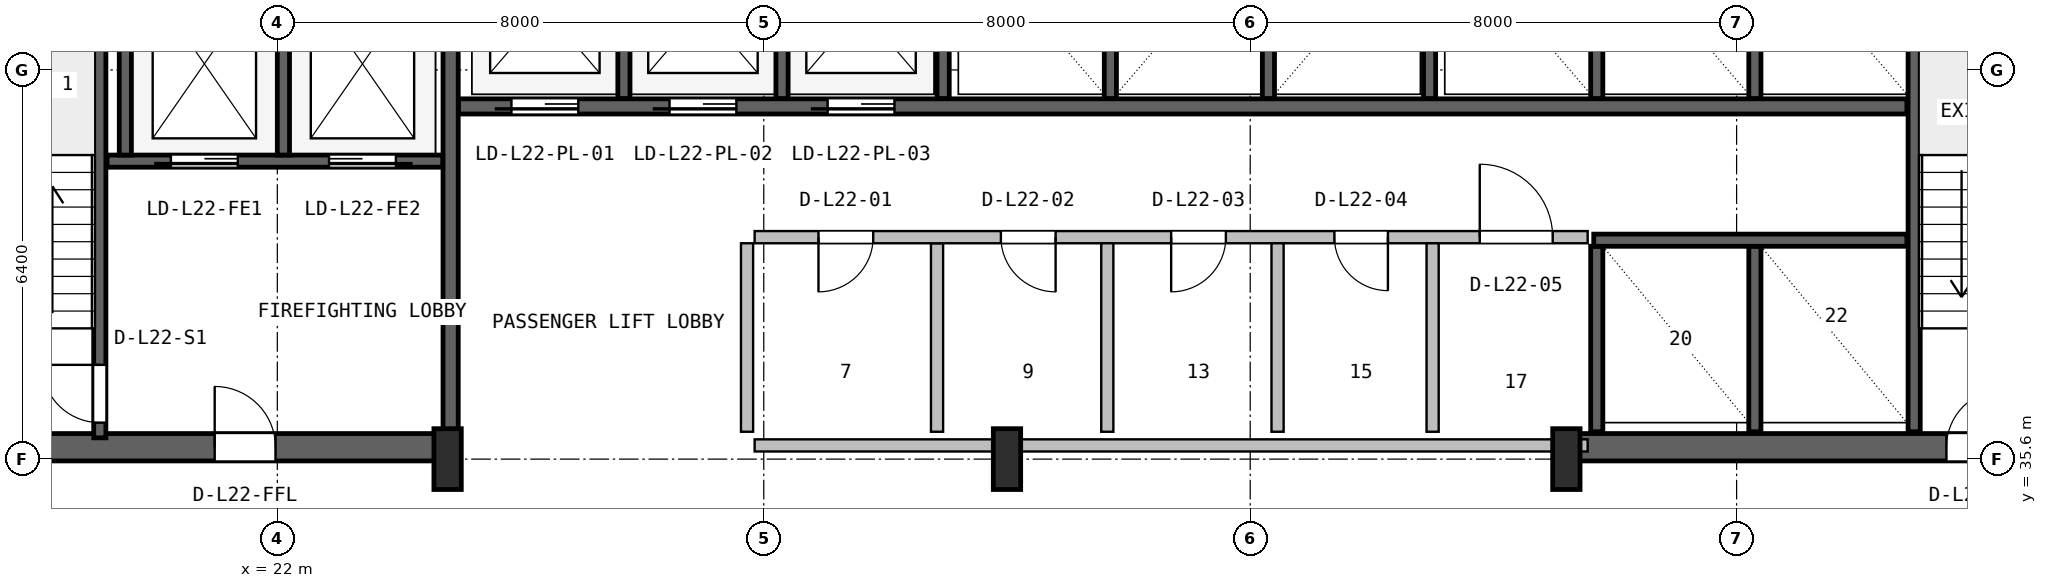
"""IFC4 building model, lengths in metres.
Left out: names, types, materials, properties, quantities, classifications, styles, units other than length and angle.
Written with IfcOpenShell. Run it as: python <this file> out.ifc"""

import sys

from ifc_helpers import new_model, si_unit, direction, frame, frame_2d, origin, origin_2d, place, context, subcontext, project, spatial, rectangle, i_section, extrude, source, transform, mapped, element, fill, save


model = new_model("IFC4")
c1 = context("Model", 3, precision=1e-05, world=origin(), true_north=direction((0.0, 1.0)))
c2 = subcontext(c1, "Body", "Model", "MODEL_VIEW")
j1 = project(units=[si_unit("LENGTHUNIT", "METRE"), si_unit("PLANEANGLEUNIT", "RADIAN")], contexts=[c1])
p1 = place(None, origin())
s1 = spatial("IfcSite", under=j1, at=p1, CompositionType="ELEMENT")
p2 = place(p1, origin())
s2 = spatial("IfcBuilding", under=s1, at=p2, CompositionType="ELEMENT")
p3 = place(p2, frame((0.0, 0.0, 94.6)))
s3 = spatial("IfcBuildingStorey", under=s2, at=p3, CompositionType="ELEMENT", Elevation=94.6)
p4 = place(p3, frame((15.57, 35.795, 0.0), z_axis=(0.0, 0.0, 1.0), x_axis=(1.0, 0.0, 0.0)))
e1 = element("IfcWall", 1, at=p4, inside=s3, PredefinedType="SHEAR", context=c2, shape_type="SweptSolid", body=[
    extrude(rectangle(XDim=9.23, YDim=0.45, at=frame_2d((4.615, 0.0))), origin(), (0.0, 0.0, 1.0), 3.52),
])
p5 = place(p4, frame((5.4, 0.0, 0.0)))
e2 = element("IfcOpeningElement", 2, at=p5, cuts=e1, PredefinedType="OPENING", context=c2, shape_type="SweptSolid", body=[
    extrude(rectangle(XDim=1.0, YDim=2.1, at=frame_2d((0.5, 1.05))), frame((0.0, 0.235, 0.0), z_axis=(0.0, -1.0, 0.0), x_axis=(1.0, 0.0, 0.0)), (0.0, 0.0, 1.0), 0.47),
])
p6 = place(p3, frame((43.2, 35.795, 0.0), z_axis=(0.0, 0.0, 1.0), x_axis=(1.0, 0.0, 0.0)))
e3 = element("IfcWall", 3, at=p6, inside=s3, PredefinedType="SHEAR", context=c2, shape_type="SweptSolid", body=[
    extrude(rectangle(XDim=9.23, YDim=0.45, at=frame_2d((4.615, 0.0))), origin(), (0.0, 0.0, 1.0), 3.52),
])
p7 = place(p6, frame((6.25, 0.0, 0.0)))
e4 = element("IfcOpeningElement", 4, at=p7, cuts=e3, PredefinedType="OPENING", context=c2, shape_type="SweptSolid", body=[
    extrude(rectangle(XDim=0.95, YDim=2.1, at=frame_2d((0.475, 1.05))), frame((0.0, 0.235, 0.0), z_axis=(0.0, -1.0, 0.0), x_axis=(1.0, 0.0, 0.0)), (0.0, 0.0, 1.0), 0.47),
])
m1 = source(origin(), c2, "Body", "SweptSolid", [
    extrude(i_section(OverallWidth=0.45, OverallDepth=1.0, WebThickness=0.016, FlangeThickness=0.03, FilletRadius=0.016, at=origin_2d()), origin(), (0.0, 0.0, 1.0), 3.8),
])
for number, where, z_axis, x_axis in (
    (5, (24.8, 35.6, 0.0), (0.0, 0.0, 1.0), (1.0, 0.0, 0.0)),
    (6, (34.0, 35.6, 0.0), (0.0, 0.0, 1.0), (1.0, 0.0, 0.0)),
    (7, (43.2, 35.6, 0.0), (0.0, 0.0, 1.0), (1.0, 0.0, 0.0)),
):
    element("IfcColumn", number, at=place(p3, frame(where, z_axis=z_axis, x_axis=x_axis)), inside=s3, PredefinedType="COLUMN", context=c2, shape_type="MappedRepresentation", body=[
        mapped(m1, transform((0.0, 0.0, 0.0), x_axis=(1.0, 0.0, 0.0), y_axis=(0.0, 1.0, 0.0), z_axis=(0.0, 0.0, 1.0), scale=1.0)),
    ])
p8 = place(p3, frame((19.08, 35.95, 0.0), z_axis=(0.0, 0.0, 1.0), x_axis=(0.0, 1.0, 0.0)))
e8 = element("IfcWall", 8, at=p8, inside=s3, PredefinedType="SHEAR", context=c2, shape_type="SweptSolid", body=[
    extrude(rectangle(XDim=9.65, YDim=0.2, at=frame_2d((4.825, 0.0))), origin(), (0.0, 0.0, 1.0), 3.52),
])
p9 = place(p8, frame((0.25, 0.0, 0.0)))
e9 = element("IfcOpeningElement", 9, at=p9, cuts=e8, PredefinedType="OPENING", context=c2, shape_type="SweptSolid", body=[
    extrude(rectangle(XDim=0.95, YDim=2.1, at=frame_2d((0.475, 1.05))), frame((0.0, 0.11, 0.0), z_axis=(0.0, -1.0, 0.0), x_axis=(1.0, 0.0, 0.0)), (0.0, 0.0, 1.0), 0.22),
])
p10 = place(p3, frame((24.85, 36.05, 0.0), z_axis=(0.0, 0.0, 1.0), x_axis=(0.0, 1.0, 0.0)))
e10 = element("IfcWall", 10, at=p10, inside=s3, PredefinedType="SHEAR", context=c2, shape_type="SweptSolid", body=[
    extrude(rectangle(XDim=10.45, YDim=0.25, at=frame_2d((5.225, 0.0))), origin(), (0.0, 0.0, 1.0), 3.52),
])
p11 = place(p3, frame((19.2, 40.5, 0.0), z_axis=(0.0, 0.0, 1.0), x_axis=(1.0, 0.0, 0.0)))
e11 = element("IfcWall", 11, at=p11, inside=s3, PredefinedType="SHEAR", context=c2, shape_type="SweptSolid", body=[
    extrude(rectangle(XDim=5.52, YDim=0.2, at=frame_2d((2.76, 0.0))), origin(), (0.0, 0.0, 1.0), 3.52),
])
p12 = place(p11, frame((1.05, 0.0, 0.0)))
e12 = element("IfcOpeningElement", 12, at=p12, cuts=e11, PredefinedType="OPENING", context=c2, shape_type="SweptSolid", body=[
    extrude(rectangle(XDim=1.1, YDim=2.18, at=frame_2d((0.55, 1.09))), frame((0.0, 0.11, 0.0), z_axis=(0.0, -1.0, 0.0), x_axis=(1.0, 0.0, 0.0)), (0.0, 0.0, 1.0), 0.22),
])
p13 = place(p11, frame((3.65, 0.0, 0.0)))
e13 = element("IfcOpeningElement", 13, at=p13, cuts=e11, PredefinedType="OPENING", context=c2, shape_type="SweptSolid", body=[
    extrude(rectangle(XDim=1.1, YDim=2.18, at=frame_2d((0.55, 1.09))), frame((0.0, 0.11, 0.0), z_axis=(0.0, -1.0, 0.0), x_axis=(1.0, 0.0, 0.0)), (0.0, 0.0, 1.0), 0.22),
])
p14 = place(p3, frame((22.1, 40.6, 0.0), z_axis=(0.0, 0.0, 1.0), x_axis=(0.0, 1.0, 0.0)))
e14 = element("IfcWall", 14, at=p14, inside=s3, PredefinedType="SHEAR", context=c2, shape_type="SweptSolid", body=[
    extrude(rectangle(XDim=3.0, YDim=0.2, at=frame_2d((1.5, 0.0))), origin(), (0.0, 0.0, 1.0), 3.52),
])
p15 = place(p3, frame((19.5, 40.6, 0.0), z_axis=(0.0, 0.0, 1.0), x_axis=(0.0, 1.0, 0.0)))
e15 = element("IfcWall", 15, at=p15, inside=s3, PredefinedType="SHEAR", context=c2, shape_type="SweptSolid", body=[
    extrude(rectangle(XDim=5.95, YDim=0.2, at=frame_2d((2.975, 0.0))), origin(), (0.0, 0.0, 1.0), 3.52),
])
p16 = place(p3, frame((48.92, 36.05, 0.0), z_axis=(0.0, 0.0, 1.0), x_axis=(0.0, 1.0, 0.0)))
e16 = element("IfcWall", 16, at=p16, inside=s3, PredefinedType="SHEAR", context=c2, shape_type="SweptSolid", body=[
    extrude(rectangle(XDim=10.5, YDim=0.2, at=frame_2d((5.25, 0.0))), origin(), (0.0, 0.0, 1.0), 3.52),
])
p17 = place(p3, frame((24.98, 41.4, 0.0), z_axis=(0.0, 0.0, 1.0), x_axis=(1.0, 0.0, 0.0)))
e17 = element("IfcWall", 17, at=p17, inside=s3, PredefinedType="SHEAR", context=c2, shape_type="SweptSolid", body=[
    extrude(rectangle(XDim=23.82, YDim=0.25, at=frame_2d((11.91, 0.0))), origin(), (0.0, 0.0, 1.0), 3.52),
])
p18 = place(p17, frame((0.87, 0.0, 0.0)))
e18 = element("IfcOpeningElement", 18, at=p18, cuts=e17, PredefinedType="OPENING", context=c2, shape_type="SweptSolid", body=[
    extrude(rectangle(XDim=1.1, YDim=2.18, at=frame_2d((0.55, 1.09))), frame((0.0, 0.135, 0.0), z_axis=(0.0, -1.0, 0.0), x_axis=(1.0, 0.0, 0.0)), (0.0, 0.0, 1.0), 0.27),
])
p19 = place(p17, frame((3.47, 0.0, 0.0)))
e19 = element("IfcOpeningElement", 19, at=p19, cuts=e17, PredefinedType="OPENING", context=c2, shape_type="SweptSolid", body=[
    extrude(rectangle(XDim=1.1, YDim=2.18, at=frame_2d((0.55, 1.09))), frame((0.0, 0.135, 0.0), z_axis=(0.0, -1.0, 0.0), x_axis=(1.0, 0.0, 0.0)), (0.0, 0.0, 1.0), 0.27),
])
p20 = place(p17, frame((6.07, 0.0, 0.0)))
e20 = element("IfcOpeningElement", 20, at=p20, cuts=e17, PredefinedType="OPENING", context=c2, shape_type="SweptSolid", body=[
    extrude(rectangle(XDim=1.1, YDim=2.18, at=frame_2d((0.55, 1.09))), frame((0.0, 0.135, 0.0), z_axis=(0.0, -1.0, 0.0), x_axis=(1.0, 0.0, 0.0)), (0.0, 0.0, 1.0), 0.27),
])
for number, where, z_axis, x_axis in (
    (21, (27.7, 41.53, 0.0), (0.0, 0.0, 1.0), (0.0, 1.0, 0.0)),
    (22, (30.3, 41.53, 0.0), (0.0, 0.0, 1.0), (0.0, 1.0, 0.0)),
):
    element("IfcWall", number, at=place(p3, frame(where, z_axis=z_axis, x_axis=x_axis)), inside=s3, PredefinedType="SHEAR", context=c2, shape_type="SweptSolid", body=[
        extrude(rectangle(XDim=2.87, YDim=0.2, at=frame_2d((1.435, 0.0))), origin(), (0.0, 0.0, 1.0), 3.52),
    ])
p21 = place(p3, frame((32.95, 41.53, 0.0), z_axis=(0.0, 0.0, 1.0), x_axis=(0.0, 1.0, 0.0)))
e23 = element("IfcWall", 23, at=p21, inside=s3, PredefinedType="SHEAR", context=c2, shape_type="SweptSolid", body=[
    extrude(rectangle(XDim=5.02, YDim=0.2, at=frame_2d((2.51, 0.0))), origin(), (0.0, 0.0, 1.0), 3.52),
])
for number, where, z_axis, x_axis in (
    (24, (35.7, 41.53, 0.0), (0.0, 0.0, 1.0), (0.0, 1.0, 0.0)),
    (25, (38.3, 41.53, 0.0), (0.0, 0.0, 1.0), (0.0, 1.0, 0.0)),
):
    element("IfcWall", number, at=place(p3, frame(where, z_axis=z_axis, x_axis=x_axis)), inside=s3, PredefinedType="SHEAR", context=c2, shape_type="SweptSolid", body=[
        extrude(rectangle(XDim=2.87, YDim=0.2, at=frame_2d((1.435, 0.0))), origin(), (0.0, 0.0, 1.0), 3.52),
    ])
p22 = place(p3, frame((40.95, 41.53, 0.0), z_axis=(0.0, 0.0, 1.0), x_axis=(0.0, 1.0, 0.0)))
e26 = element("IfcWall", 26, at=p22, inside=s3, PredefinedType="SHEAR", context=c2, shape_type="SweptSolid", body=[
    extrude(rectangle(XDim=5.02, YDim=0.2, at=frame_2d((2.51, 0.0))), origin(), (0.0, 0.0, 1.0), 3.52),
])
for number, where, z_axis, x_axis in (
    (27, (43.7, 41.53, 0.0), (0.0, 0.0, 1.0), (0.0, 1.0, 0.0)),
    (28, (46.3, 41.53, 0.0), (0.0, 0.0, 1.0), (0.0, 1.0, 0.0)),
):
    element("IfcWall", number, at=place(p3, frame(where, z_axis=z_axis, x_axis=x_axis)), inside=s3, PredefinedType="SHEAR", context=c2, shape_type="SweptSolid", body=[
        extrude(rectangle(XDim=2.87, YDim=0.2, at=frame_2d((1.435, 0.0))), origin(), (0.0, 0.0, 1.0), 3.52),
    ])
for number, where, z_axis, x_axis in (
    (29, (43.7, 36.05, 0.0), (0.0, 0.0, 1.0), (0.0, 1.0, 0.0)),
    (30, (46.3, 36.05, 0.0), (0.0, 0.0, 1.0), (0.0, 1.0, 0.0)),
):
    element("IfcWall", number, at=place(p3, frame(where, z_axis=z_axis, x_axis=x_axis)), inside=s3, PredefinedType="SHEAR", context=c2, shape_type="SweptSolid", body=[
        extrude(rectangle(XDim=3.05, YDim=0.2, at=frame_2d((1.525, 0.0))), origin(), (0.0, 0.0, 1.0), 3.52),
    ])
p23 = place(p3, frame((43.65, 39.2, 0.0), z_axis=(0.0, 0.0, 1.0), x_axis=(1.0, 0.0, 0.0)))
e31 = element("IfcWall", 31, at=p23, inside=s3, PredefinedType="SHEAR", context=c2, shape_type="SweptSolid", body=[
    extrude(rectangle(XDim=5.15, YDim=0.2, at=frame_2d((2.575, 0.0))), origin(), (0.0, 0.0, 1.0), 3.52),
])
p24 = place(p3, frame((29.85, 35.825, 0.0), z_axis=(0.0, 0.0, 1.0), x_axis=(1.0, 0.0, 0.0)))
e32 = element("IfcWall", 32, at=p24, inside=s3, PredefinedType="SOLIDWALL", context=c2, shape_type="SweptSolid", body=[
    extrude(rectangle(XDim=13.7, YDim=0.2, at=frame_2d((6.85, 0.0))), origin(), (0.0, 0.0, 1.0), 2.295),
])
p25 = place(p3, frame((32.85, 36.05, 0.0), z_axis=(0.0, 0.0, 1.0), x_axis=(0.0, 1.0, 0.0)))
e33 = element("IfcWall", 33, at=p25, inside=s3, PredefinedType="PLUMBINGWALL", context=c2, shape_type="SweptSolid", body=[
    extrude(rectangle(XDim=3.1, YDim=0.2, at=frame_2d((1.55, 0.0))), origin(), (0.0, 0.0, 1.0), 3.5),
])
p26 = place(p3, frame((29.85, 39.25, 0.0), z_axis=(0.0, 0.0, 1.0), x_axis=(1.0, 0.0, 0.0)))
e34 = element("IfcWall", 34, at=p26, inside=s3, PredefinedType="SOLIDWALL", context=c2, shape_type="SweptSolid", body=[
    extrude(rectangle(XDim=13.7, YDim=0.2, at=frame_2d((6.85, 0.0))), origin(), (0.0, 0.0, 1.0), 3.5),
])
p27 = place(p26, frame((1.05, 0.0, 0.0)))
e35 = element("IfcOpeningElement", 35, at=p27, cuts=e34, PredefinedType="OPENING", context=c2, shape_type="SweptSolid", body=[
    extrude(rectangle(XDim=0.9, YDim=2.06, at=frame_2d((0.45, 1.03))), frame((0.0, 0.11, 0.0), z_axis=(0.0, -1.0, 0.0), x_axis=(1.0, 0.0, 0.0)), (0.0, 0.0, 1.0), 0.22),
])
p28 = place(p26, frame((4.05, 0.0, 0.0)))
e36 = element("IfcOpeningElement", 36, at=p28, cuts=e34, PredefinedType="OPENING", context=c2, shape_type="SweptSolid", body=[
    extrude(rectangle(XDim=0.9, YDim=2.06, at=frame_2d((0.45, 1.03))), frame((0.0, 0.11, 0.0), z_axis=(0.0, -1.0, 0.0), x_axis=(1.0, 0.0, 0.0)), (0.0, 0.0, 1.0), 0.22),
])
p29 = place(p26, frame((6.85, 0.0, 0.0)))
e37 = element("IfcOpeningElement", 37, at=p29, cuts=e34, PredefinedType="OPENING", context=c2, shape_type="SweptSolid", body=[
    extrude(rectangle(XDim=0.9, YDim=2.06, at=frame_2d((0.45, 1.03))), frame((0.0, 0.11, 0.0), z_axis=(0.0, -1.0, 0.0), x_axis=(1.0, 0.0, 0.0)), (0.0, 0.0, 1.0), 0.22),
])
p30 = place(p26, frame((9.535, 0.0, 0.0)))
e38 = element("IfcOpeningElement", 38, at=p30, cuts=e34, PredefinedType="OPENING", context=c2, shape_type="SweptSolid", body=[
    extrude(rectangle(XDim=0.88, YDim=2.06, at=frame_2d((0.44, 1.03))), frame((0.0, 0.11, 0.0), z_axis=(0.0, -1.0, 0.0), x_axis=(1.0, 0.0, 0.0)), (0.0, 0.0, 1.0), 0.22),
])
p31 = place(p26, frame((11.925, 0.0, 0.0)))
e39 = element("IfcOpeningElement", 39, at=p31, cuts=e34, PredefinedType="OPENING", context=c2, shape_type="SweptSolid", body=[
    extrude(rectangle(XDim=1.2, YDim=2.1, at=frame_2d((0.6, 1.05))), frame((0.0, 0.11, 0.0), z_axis=(0.0, -1.0, 0.0), x_axis=(1.0, 0.0, 0.0)), (0.0, 0.0, 1.0), 0.22),
])
for number, where, z_axis, x_axis in (
    (40, (29.725, 36.05, 0.0), (0.0, 0.0, 1.0), (0.0, 1.0, 0.0)),
    (41, (35.65, 36.05, 0.0), (0.0, 0.0, 1.0), (0.0, 1.0, 0.0)),
    (42, (38.45, 36.05, 0.0), (0.0, 0.0, 1.0), (0.0, 1.0, 0.0)),
):
    element("IfcWall", number, at=place(p3, frame(where, z_axis=z_axis, x_axis=x_axis)), inside=s3, PredefinedType="PLUMBINGWALL", context=c2, shape_type="SweptSolid", body=[
        extrude(rectangle(XDim=3.1, YDim=0.2, at=frame_2d((1.55, 0.0))), origin(), (0.0, 0.0, 1.0), 3.5),
    ])
p32 = place(p3, frame((41.0, 36.05, 0.0), z_axis=(0.0, 0.0, 1.0), x_axis=(0.0, 1.0, 0.0)))
e43 = element("IfcWall", 43, at=p32, inside=s3, PredefinedType="SOLIDWALL", context=c2, shape_type="SweptSolid", body=[
    extrude(rectangle(XDim=3.1, YDim=0.2, at=frame_2d((1.55, 0.0))), origin(), (0.0, 0.0, 1.0), 3.5),
])
m2 = source(origin(), c2, "Body", "SweptSolid", [
    extrude(rectangle(XDim=0.95, YDim=2.1, at=frame_2d((0.475, 1.05))), frame((0.0, 0.025, 0.0), z_axis=(0.0, -1.0, 0.0), x_axis=(1.0, 0.0, 0.0)), (0.0, 0.0, 1.0), 0.05),
])
p33 = place(p9, origin())
e44 = element("IfcDoor", 44, at=p33, inside=s3, OperationType="SINGLE_SWING_RIGHT", PredefinedType="DOOR", context=c2, shape_type="MappedRepresentation", body=[
    mapped(m2, transform((0.0, 0.0, 0.0), x_axis=(1.0, 0.0, 0.0), y_axis=(0.0, 1.0, 0.0), z_axis=(0.0, 0.0, 1.0), scale=1.0)),
])
fill(e9, e44)
m3 = source(origin(), c2, "Body", "SweptSolid", [
    extrude(rectangle(XDim=1.0, YDim=2.1, at=frame_2d((0.5, 1.05))), frame((0.0, 0.025, 0.0), z_axis=(0.0, -1.0, 0.0), x_axis=(1.0, 0.0, 0.0)), (0.0, 0.0, 1.0), 0.05),
])
p34 = place(p5, origin())
e45 = element("IfcDoor", 45, at=p34, inside=s3, OperationType="SINGLE_SWING_LEFT", PredefinedType="DOOR", context=c2, shape_type="MappedRepresentation", body=[
    mapped(m3, transform((0.0, 0.0, 0.0), x_axis=(1.0, 0.0, 0.0), y_axis=(0.0, 1.0, 0.0), z_axis=(0.0, 0.0, 1.0), scale=1.0)),
])
fill(e2, e45)
m4 = source(origin(), c2, "Body", "SweptSolid", [
    extrude(rectangle(XDim=1.1, YDim=2.18, at=frame_2d((0.55, 1.09))), frame((0.0, 0.025, 0.0), z_axis=(0.0, -1.0, 0.0), x_axis=(1.0, 0.0, 0.0)), (0.0, 0.0, 1.0), 0.05),
])
p35 = place(p12, frame((1.1, 0.0, 0.0), z_axis=(0.0, 0.0, 1.0), x_axis=(-1.0, 0.0, 0.0)))
e46 = element("IfcDoor", 46, at=p35, inside=s3, OperationType="SLIDING_TO_LEFT", PredefinedType="DOOR", context=c2, shape_type="MappedRepresentation", body=[
    mapped(m4, transform((0.0, 0.0, 0.0), x_axis=(1.0, 0.0, 0.0), y_axis=(0.0, 1.0, 0.0), z_axis=(0.0, 0.0, 1.0), scale=1.0)),
])
fill(e12, e46)
p36 = place(p13, frame((1.1, 0.0, 0.0), z_axis=(0.0, 0.0, 1.0), x_axis=(-1.0, 0.0, 0.0)))
e47 = element("IfcDoor", 47, at=p36, inside=s3, OperationType="SLIDING_TO_RIGHT", PredefinedType="DOOR", context=c2, shape_type="MappedRepresentation", body=[
    mapped(m4, transform((0.0, 0.0, 0.0), x_axis=(1.0, 0.0, 0.0), y_axis=(0.0, 1.0, 0.0), z_axis=(0.0, 0.0, 1.0), scale=1.0)),
])
fill(e13, e47)
p37 = place(p7, origin())
e48 = element("IfcDoor", 48, at=p37, inside=s3, OperationType="SINGLE_SWING_RIGHT", PredefinedType="DOOR", context=c2, shape_type="MappedRepresentation", body=[
    mapped(m2, transform((0.0, 0.0, 0.0), x_axis=(1.0, 0.0, 0.0), y_axis=(0.0, 1.0, 0.0), z_axis=(0.0, 0.0, 1.0), scale=1.0)),
])
fill(e4, e48)
p38 = place(p18, frame((1.1, 0.0, 0.0), z_axis=(0.0, 0.0, 1.0), x_axis=(-1.0, 0.0, 0.0)))
e49 = element("IfcDoor", 49, at=p38, inside=s3, OperationType="SLIDING_TO_LEFT", PredefinedType="DOOR", context=c2, shape_type="MappedRepresentation", body=[
    mapped(m4, transform((0.0, 0.0, 0.0), x_axis=(1.0, 0.0, 0.0), y_axis=(0.0, 1.0, 0.0), z_axis=(0.0, 0.0, 1.0), scale=1.0)),
])
fill(e18, e49)
p39 = place(p19, frame((1.1, 0.0, 0.0), z_axis=(0.0, 0.0, 1.0), x_axis=(-1.0, 0.0, 0.0)))
e50 = element("IfcDoor", 50, at=p39, inside=s3, OperationType="SLIDING_TO_LEFT", PredefinedType="DOOR", context=c2, shape_type="MappedRepresentation", body=[
    mapped(m4, transform((0.0, 0.0, 0.0), x_axis=(1.0, 0.0, 0.0), y_axis=(0.0, 1.0, 0.0), z_axis=(0.0, 0.0, 1.0), scale=1.0)),
])
fill(e19, e50)
p40 = place(p20, frame((1.1, 0.0, 0.0), z_axis=(0.0, 0.0, 1.0), x_axis=(-1.0, 0.0, 0.0)))
e51 = element("IfcDoor", 51, at=p40, inside=s3, OperationType="SLIDING_TO_LEFT", PredefinedType="DOOR", context=c2, shape_type="MappedRepresentation", body=[
    mapped(m4, transform((0.0, 0.0, 0.0), x_axis=(1.0, 0.0, 0.0), y_axis=(0.0, 1.0, 0.0), z_axis=(0.0, 0.0, 1.0), scale=1.0)),
])
fill(e20, e51)
m5 = source(origin(), c2, "Body", "SweptSolid", [
    extrude(rectangle(XDim=0.9, YDim=2.06, at=frame_2d((0.45, 1.03))), frame((0.0, 0.025, 0.0), z_axis=(0.0, -1.0, 0.0), x_axis=(1.0, 0.0, 0.0)), (0.0, 0.0, 1.0), 0.05),
])
p41 = place(p27, frame((0.9, 0.0, 0.0), z_axis=(0.0, 0.0, 1.0), x_axis=(-1.0, 0.0, 0.0)))
e52 = element("IfcDoor", 52, at=p41, inside=s3, OperationType="SINGLE_SWING_LEFT", PredefinedType="DOOR", context=c2, shape_type="MappedRepresentation", body=[
    mapped(m5, transform((0.0, 0.0, 0.0), x_axis=(1.0, 0.0, 0.0), y_axis=(0.0, 1.0, 0.0), z_axis=(0.0, 0.0, 1.0), scale=1.0)),
])
fill(e35, e52)
p42 = place(p28, frame((0.9, 0.0, 0.0), z_axis=(0.0, 0.0, 1.0), x_axis=(-1.0, 0.0, 0.0)))
e53 = element("IfcDoor", 53, at=p42, inside=s3, OperationType="SINGLE_SWING_RIGHT", PredefinedType="DOOR", context=c2, shape_type="MappedRepresentation", body=[
    mapped(m5, transform((0.0, 0.0, 0.0), x_axis=(1.0, 0.0, 0.0), y_axis=(0.0, 1.0, 0.0), z_axis=(0.0, 0.0, 1.0), scale=1.0)),
])
fill(e36, e53)
p43 = place(p29, frame((0.9, 0.0, 0.0), z_axis=(0.0, 0.0, 1.0), x_axis=(-1.0, 0.0, 0.0)))
e54 = element("IfcDoor", 54, at=p43, inside=s3, OperationType="SINGLE_SWING_LEFT", PredefinedType="DOOR", context=c2, shape_type="MappedRepresentation", body=[
    mapped(m5, transform((0.0, 0.0, 0.0), x_axis=(1.0, 0.0, 0.0), y_axis=(0.0, 1.0, 0.0), z_axis=(0.0, 0.0, 1.0), scale=1.0)),
])
fill(e37, e54)
m6 = source(origin(), c2, "Body", "SweptSolid", [
    extrude(rectangle(XDim=0.88, YDim=2.06, at=frame_2d((0.44, 1.03))), frame((0.0, 0.025, 0.0), z_axis=(0.0, -1.0, 0.0), x_axis=(1.0, 0.0, 0.0)), (0.0, 0.0, 1.0), 0.05),
])
p44 = place(p30, frame((0.88, 0.0, 0.0), z_axis=(0.0, 0.0, 1.0), x_axis=(-1.0, 0.0, 0.0)))
e55 = element("IfcDoor", 55, at=p44, inside=s3, OperationType="SINGLE_SWING_RIGHT", PredefinedType="DOOR", context=c2, shape_type="MappedRepresentation", body=[
    mapped(m6, transform((0.0, 0.0, 0.0), x_axis=(1.0, 0.0, 0.0), y_axis=(0.0, 1.0, 0.0), z_axis=(0.0, 0.0, 1.0), scale=1.0)),
])
fill(e38, e55)
m7 = source(origin(), c2, "Body", "SweptSolid", [
    extrude(rectangle(XDim=1.2, YDim=2.1, at=frame_2d((0.6, 1.05))), frame((0.0, 0.025, 0.0), z_axis=(0.0, -1.0, 0.0), x_axis=(1.0, 0.0, 0.0)), (0.0, 0.0, 1.0), 0.05),
])
p45 = place(p31, origin())
e56 = element("IfcDoor", 56, at=p45, inside=s3, OperationType="SINGLE_SWING_LEFT", PredefinedType="DOOR", context=c2, shape_type="MappedRepresentation", body=[
    mapped(m7, transform((0.0, 0.0, 0.0), x_axis=(1.0, 0.0, 0.0), y_axis=(0.0, 1.0, 0.0), z_axis=(0.0, 0.0, 1.0), scale=1.0)),
])
fill(e39, e56)
save(model, sys.argv[1])
